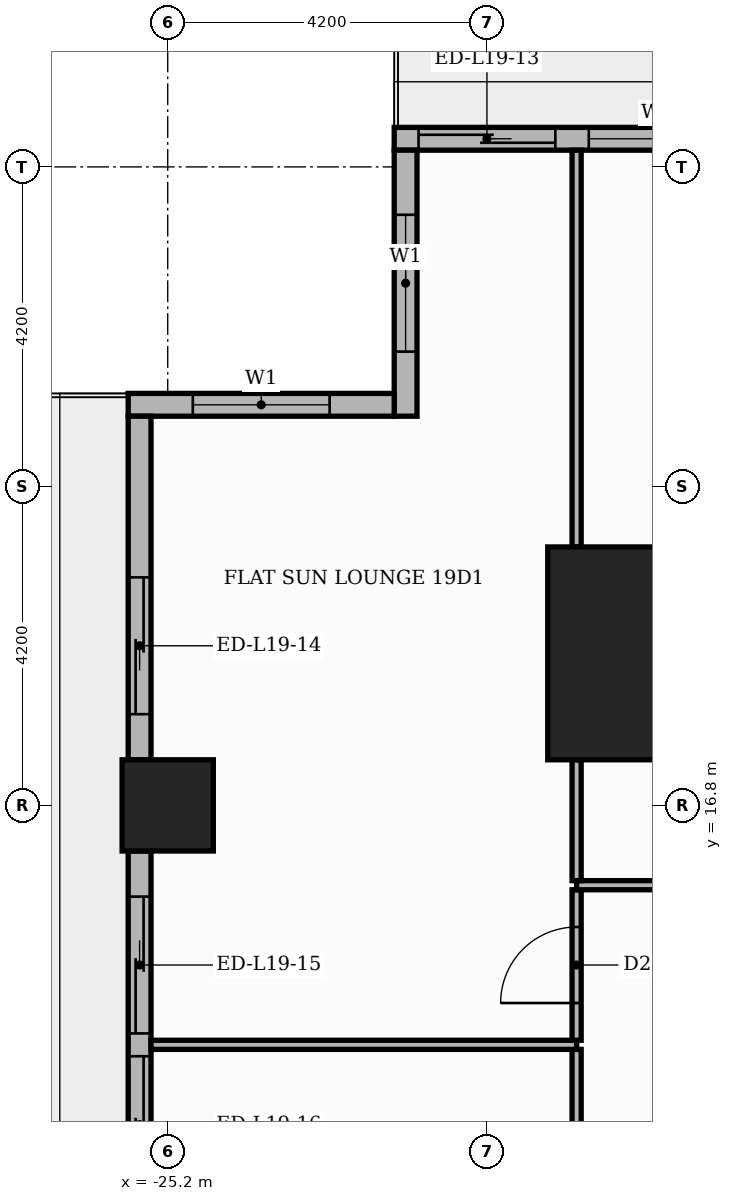
"""IFC4 building model, lengths in metres.
Left out: names, types, materials, properties, quantities, classifications, styles, units other than length and angle.
Written with IfcOpenShell. Run it as: python <this file> out.ifc"""

import sys

from ifc_helpers import new_model, si_unit, direction, frame, frame_2d, origin, origin_2d, place, context, subcontext, project, spatial, rectangle, extrude, element, fill, save


model = new_model("IFC4")
c1 = context("Model", 3, precision=1e-05, world=origin(), true_north=direction((0.0, 1.0)))
c2 = subcontext(c1, "Body", "Model", "MODEL_VIEW")
j1 = project(units=[si_unit("LENGTHUNIT", "METRE"), si_unit("PLANEANGLEUNIT", "RADIAN")], contexts=[c1])
p1 = place(None, origin())
s1 = spatial("IfcSite", under=j1, at=p1, CompositionType="ELEMENT")
p2 = place(p1, origin())
s2 = spatial("IfcBuilding", under=s1, at=p2, CompositionType="ELEMENT")
p3 = place(p2, frame((0.0, 0.0, 83.1)))
s3 = spatial("IfcBuildingStorey", under=s2, at=p3, CompositionType="ELEMENT", Elevation=83.1)
p4 = place(p3, frame((-18.8, 18.8, 0.0), z_axis=(0.0, 0.0, 1.0), x_axis=(1.0, 0.0, 0.0)))
e1 = element("IfcColumn", 1, at=p4, inside=s3, PredefinedType="COLUMN", context=c2, shape_type="SweptSolid", body=[
    extrude(rectangle(XDim=2.8, YDim=2.8, at=origin_2d()), origin(), (0.0, 0.0, 1.0), 3.9),
])
p5 = place(p3, frame((-25.2, 16.8, 0.0), z_axis=(0.0, 0.0, 1.0), x_axis=(1.0, 0.0, 0.0)))
e2 = element("IfcColumn", 2, at=p5, inside=s3, PredefinedType="COLUMN", context=c2, shape_type="SweptSolid", body=[
    extrude(rectangle(XDim=1.2, YDim=1.2, at=origin_2d()), origin(), (0.0, 0.0, 1.0), 3.9),
])
p6 = place(p3, frame((-17.4, 25.57, 0.0), z_axis=(0.0, 0.0, 1.0), x_axis=(-1.0, 0.0, 0.0)))
e3 = element("IfcWall", 3, at=p6, inside=s3, PredefinedType="STANDARD", context=c2, shape_type="SweptSolid", body=[
    extrude(rectangle(XDim=4.82, YDim=0.3, at=frame_2d((2.41, 0.0))), origin(), (0.0, 0.0, 1.0), 3.48),
])
p7 = place(p6, frame((2.7, 0.0, 0.0)))
e4 = element("IfcOpeningElement", 4, at=p7, cuts=e3, PredefinedType="OPENING", context=c2, shape_type="SweptSolid", body=[
    extrude(rectangle(XDim=1.8, YDim=2.4, at=frame_2d((0.9, 1.2))), frame((0.0, 0.16, 0.0), z_axis=(0.0, -1.0, 0.0), x_axis=(1.0, 0.0, 0.0)), (0.0, 0.0, 1.0), 0.32),
])
p8 = place(p6, frame((0.46, 0.0, 0.9)))
e5 = element("IfcOpeningElement", 5, at=p8, cuts=e3, PredefinedType="OPENING", context=c2, shape_type="SweptSolid", body=[
    extrude(rectangle(XDim=1.8, YDim=2.1, at=frame_2d((0.9, 1.05))), frame((0.0, 0.16, 0.0), z_axis=(0.0, -1.0, 0.0), x_axis=(1.0, 0.0, 0.0)), (0.0, 0.0, 1.0), 0.32),
])
p9 = place(p3, frame((-22.07, 25.42, 0.0), z_axis=(0.0, 0.0, 1.0), x_axis=(0.0, -1.0, 0.0)))
e6 = element("IfcWall", 6, at=p9, inside=s3, PredefinedType="STANDARD", context=c2, shape_type="SweptSolid", body=[
    extrude(rectangle(XDim=3.5, YDim=0.3, at=frame_2d((1.75, 0.0))), origin(), (0.0, 0.0, 1.0), 3.48),
])
p10 = place(p9, frame((0.85, 0.0, 0.9)))
e7 = element("IfcOpeningElement", 7, at=p10, cuts=e6, PredefinedType="OPENING", context=c2, shape_type="SweptSolid", body=[
    extrude(rectangle(XDim=1.8, YDim=2.1, at=frame_2d((0.9, 1.05))), frame((0.0, 0.16, 0.0), z_axis=(0.0, -1.0, 0.0), x_axis=(1.0, 0.0, 0.0)), (0.0, 0.0, 1.0), 0.32),
])
p11 = place(p3, frame((-22.22, 22.07, 0.0), z_axis=(0.0, 0.0, 1.0), x_axis=(-1.0, 0.0, 0.0)))
e8 = element("IfcWall", 8, at=p11, inside=s3, PredefinedType="STANDARD", context=c2, shape_type="SweptSolid", body=[
    extrude(rectangle(XDim=3.5, YDim=0.3, at=frame_2d((1.75, 0.0))), origin(), (0.0, 0.0, 1.0), 3.48),
])
p12 = place(p11, frame((0.85, 0.0, 0.9)))
e9 = element("IfcOpeningElement", 9, at=p12, cuts=e8, PredefinedType="OPENING", context=c2, shape_type="SweptSolid", body=[
    extrude(rectangle(XDim=1.8, YDim=2.1, at=frame_2d((0.9, 1.05))), frame((0.0, 0.16, 0.0), z_axis=(0.0, -1.0, 0.0), x_axis=(1.0, 0.0, 0.0)), (0.0, 0.0, 1.0), 0.32),
])
p13 = place(p3, frame((-25.57, 21.92, 0.0), z_axis=(0.0, 0.0, 1.0), x_axis=(0.0, -1.0, 0.0)))
e10 = element("IfcWall", 10, at=p13, inside=s3, PredefinedType="STANDARD", context=c2, shape_type="SweptSolid", body=[
    extrude(rectangle(XDim=4.52, YDim=0.3, at=frame_2d((2.26, 0.0))), origin(), (0.0, 0.0, 1.0), 3.48),
])
p14 = place(p13, frame((2.12, 0.0, 0.0)))
e11 = element("IfcOpeningElement", 11, at=p14, cuts=e10, PredefinedType="OPENING", context=c2, shape_type="SweptSolid", body=[
    extrude(rectangle(XDim=1.8, YDim=2.4, at=frame_2d((0.9, 1.2))), frame((0.0, 0.16, 0.0), z_axis=(0.0, -1.0, 0.0), x_axis=(1.0, 0.0, 0.0)), (0.0, 0.0, 1.0), 0.32),
])
p15 = place(p3, frame((-25.57, 16.2, 0.0), z_axis=(0.0, 0.0, 1.0), x_axis=(0.0, -1.0, 0.0)))
e12 = element("IfcWall", 12, at=p15, inside=s3, PredefinedType="STANDARD", context=c2, shape_type="SweptSolid", body=[
    extrude(rectangle(XDim=7.2, YDim=0.3, at=frame_2d((3.6, 0.0))), origin(), (0.0, 0.0, 1.0), 3.48),
])
p16 = place(p15, frame((0.6, 0.0, 0.0)))
e13 = element("IfcOpeningElement", 13, at=p16, cuts=e12, PredefinedType="OPENING", context=c2, shape_type="SweptSolid", body=[
    extrude(rectangle(XDim=1.8, YDim=2.4, at=frame_2d((0.9, 1.2))), frame((0.0, 0.16, 0.0), z_axis=(0.0, -1.0, 0.0), x_axis=(1.0, 0.0, 0.0)), (0.0, 0.0, 1.0), 0.32),
])
p17 = place(p15, frame((2.7, 0.0, 0.0)))
e14 = element("IfcOpeningElement", 14, at=p17, cuts=e12, PredefinedType="OPENING", context=c2, shape_type="SweptSolid", body=[
    extrude(rectangle(XDim=1.8, YDim=2.4, at=frame_2d((0.9, 1.2))), frame((0.0, 0.16, 0.0), z_axis=(0.0, -1.0, 0.0), x_axis=(1.0, 0.0, 0.0)), (0.0, 0.0, 1.0), 0.32),
])
p18 = place(p15, frame((4.8, 0.0, 0.9)))
e15 = element("IfcOpeningElement", 15, at=p18, cuts=e12, PredefinedType="OPENING", context=c2, shape_type="SweptSolid", body=[
    extrude(rectangle(XDim=1.8, YDim=2.1, at=frame_2d((0.9, 1.05))), frame((0.0, 0.16, 0.0), z_axis=(0.0, -1.0, 0.0), x_axis=(1.0, 0.0, 0.0)), (0.0, 0.0, 1.0), 0.32),
])
p19 = place(p3, frame((-19.82, 9.51, 0.0), z_axis=(0.0, 0.0, 1.0), x_axis=(0.0, 1.0, 0.0)))
e16 = element("IfcWall", 16, at=p19, inside=s3, PredefinedType="PARTITIONING", context=c2, shape_type="SweptSolid", body=[
    extrude(rectangle(XDim=4.08, YDim=0.12, at=frame_2d((2.04, 0.0))), origin(), (0.0, 0.0, 1.0), 3.48),
])
p20 = place(p19, frame((1.59, 0.0, 0.0)))
e17 = element("IfcOpeningElement", 17, at=p20, cuts=e16, PredefinedType="OPENING", context=c2, shape_type="SweptSolid", body=[
    extrude(rectangle(XDim=0.9, YDim=2.1, at=frame_2d((0.45, 1.05))), frame((0.0, 0.07, 0.0), z_axis=(0.0, -1.0, 0.0), x_axis=(1.0, 0.0, 0.0)), (0.0, 0.0, 1.0), 0.14),
])
p21 = place(p3, frame((-25.42, 13.65, 0.0), z_axis=(0.0, 0.0, 1.0), x_axis=(1.0, 0.0, 0.0)))
e18 = element("IfcWall", 18, at=p21, inside=s3, PredefinedType="PARTITIONING", context=c2, shape_type="SweptSolid", body=[
    extrude(rectangle(XDim=5.6, YDim=0.12, at=frame_2d((2.8, 0.0))), origin(), (0.0, 0.0, 1.0), 3.48),
])
p22 = place(p3, frame((-19.82, 13.71, 0.0), z_axis=(0.0, 0.0, 1.0), x_axis=(0.0, 1.0, 0.0)))
e19 = element("IfcWall", 19, at=p22, inside=s3, PredefinedType="PARTITIONING", context=c2, shape_type="SweptSolid", body=[
    extrude(rectangle(XDim=1.98, YDim=0.12, at=frame_2d((0.99, 0.0))), origin(), (0.0, 0.0, 1.0), 3.48),
])
p23 = place(p22, frame((0.49, 0.0, 0.0)))
e20 = element("IfcOpeningElement", 20, at=p23, cuts=e19, PredefinedType="OPENING", context=c2, shape_type="SweptSolid", body=[
    extrude(rectangle(XDim=1.0, YDim=2.1, at=frame_2d((0.5, 1.05))), frame((0.0, 0.07, 0.0), z_axis=(0.0, -1.0, 0.0), x_axis=(1.0, 0.0, 0.0)), (0.0, 0.0, 1.0), 0.14),
])
p24 = place(p3, frame((-19.82, 15.75, 0.0), z_axis=(0.0, 0.0, 1.0), x_axis=(1.0, 0.0, 0.0)))
e21 = element("IfcWall", 21, at=p24, inside=s3, PredefinedType="PARTITIONING", context=c2, shape_type="SweptSolid", body=[
    extrude(rectangle(XDim=6.07, YDim=0.12, at=frame_2d((3.035, 0.0))), origin(), (0.0, 0.0, 1.0), 3.48),
])
p25 = place(p24, frame((2.585, 0.0, 0.0)))
e22 = element("IfcOpeningElement", 22, at=p25, cuts=e21, PredefinedType="OPENING", context=c2, shape_type="SweptSolid", body=[
    extrude(rectangle(XDim=1.0, YDim=2.1, at=frame_2d((0.5, 1.05))), frame((0.0, 0.07, 0.0), z_axis=(0.0, -1.0, 0.0), x_axis=(1.0, 0.0, 0.0)), (0.0, 0.0, 1.0), 0.14),
])
p26 = place(p3, frame((-19.82, 15.81, 0.0), z_axis=(0.0, 0.0, 1.0), x_axis=(0.0, 1.0, 0.0)))
e23 = element("IfcWall", 23, at=p26, inside=s3, PredefinedType="PARTITIONING", context=c2, shape_type="SweptSolid", body=[
    extrude(rectangle(XDim=1.59, YDim=0.12, at=frame_2d((0.795, 0.0))), origin(), (0.0, 0.0, 1.0), 3.48),
])
p27 = place(p3, frame((-19.82, 20.2, 0.0), z_axis=(0.0, 0.0, 1.0), x_axis=(0.0, 1.0, 0.0)))
e24 = element("IfcWall", 24, at=p27, inside=s3, PredefinedType="PARTITIONING", context=c2, shape_type="SweptSolid", body=[
    extrude(rectangle(XDim=5.22, YDim=0.12, at=frame_2d((2.61, 0.0))), origin(), (0.0, 0.0, 1.0), 3.48),
])
p28 = place(p7, origin())
e25 = element("IfcDoor", 25, at=p28, inside=s3, OperationType="SLIDING_TO_LEFT", PredefinedType="DOOR", context=c2, shape_type="SweptSolid", body=[
    extrude(rectangle(XDim=1.8, YDim=2.4, at=frame_2d((0.9, 1.2))), frame((0.0, 0.025, 0.0), z_axis=(0.0, -1.0, 0.0), x_axis=(1.0, 0.0, 0.0)), (0.0, 0.0, 1.0), 0.05),
])
fill(e4, e25)
p29 = place(p8, origin())
e26 = element("IfcWindow", 26, at=p29, inside=s3, PartitioningType="SINGLE_PANEL", PredefinedType="WINDOW", context=c2, shape_type="SweptSolid", body=[
    extrude(rectangle(XDim=1.8, YDim=2.1, at=frame_2d((0.9, 1.05))), frame((0.0, 0.03, 0.0), z_axis=(0.0, -1.0, 0.0), x_axis=(1.0, 0.0, 0.0)), (0.0, 0.0, 1.0), 0.06),
])
fill(e5, e26)
p30 = place(p10, origin())
e27 = element("IfcWindow", 27, at=p30, inside=s3, PartitioningType="SINGLE_PANEL", PredefinedType="WINDOW", context=c2, shape_type="SweptSolid", body=[
    extrude(rectangle(XDim=1.8, YDim=2.1, at=frame_2d((0.9, 1.05))), frame((0.0, 0.03, 0.0), z_axis=(0.0, -1.0, 0.0), x_axis=(1.0, 0.0, 0.0)), (0.0, 0.0, 1.0), 0.06),
])
fill(e7, e27)
p31 = place(p12, origin())
e28 = element("IfcWindow", 28, at=p31, inside=s3, PartitioningType="SINGLE_PANEL", PredefinedType="WINDOW", context=c2, shape_type="SweptSolid", body=[
    extrude(rectangle(XDim=1.8, YDim=2.1, at=frame_2d((0.9, 1.05))), frame((0.0, 0.03, 0.0), z_axis=(0.0, -1.0, 0.0), x_axis=(1.0, 0.0, 0.0)), (0.0, 0.0, 1.0), 0.06),
])
fill(e9, e28)
p32 = place(p14, origin())
e29 = element("IfcDoor", 29, at=p32, inside=s3, OperationType="SLIDING_TO_RIGHT", PredefinedType="DOOR", context=c2, shape_type="SweptSolid", body=[
    extrude(rectangle(XDim=1.8, YDim=2.4, at=frame_2d((0.9, 1.2))), frame((0.0, 0.025, 0.0), z_axis=(0.0, -1.0, 0.0), x_axis=(1.0, 0.0, 0.0)), (0.0, 0.0, 1.0), 0.05),
])
fill(e11, e29)
p33 = place(p16, origin())
e30 = element("IfcDoor", 30, at=p33, inside=s3, OperationType="SLIDING_TO_LEFT", PredefinedType="DOOR", context=c2, shape_type="SweptSolid", body=[
    extrude(rectangle(XDim=1.8, YDim=2.4, at=frame_2d((0.9, 1.2))), frame((0.0, 0.025, 0.0), z_axis=(0.0, -1.0, 0.0), x_axis=(1.0, 0.0, 0.0)), (0.0, 0.0, 1.0), 0.05),
])
fill(e13, e30)
p34 = place(p17, origin())
e31 = element("IfcDoor", 31, at=p34, inside=s3, OperationType="SLIDING_TO_RIGHT", PredefinedType="DOOR", context=c2, shape_type="SweptSolid", body=[
    extrude(rectangle(XDim=1.8, YDim=2.4, at=frame_2d((0.9, 1.2))), frame((0.0, 0.025, 0.0), z_axis=(0.0, -1.0, 0.0), x_axis=(1.0, 0.0, 0.0)), (0.0, 0.0, 1.0), 0.05),
])
fill(e14, e31)
p35 = place(p23, origin())
e32 = element("IfcDoor", 32, at=p35, inside=s3, OperationType="SINGLE_SWING_LEFT", PredefinedType="DOOR", context=c2, shape_type="SweptSolid", body=[
    extrude(rectangle(XDim=1.0, YDim=2.1, at=frame_2d((0.5, 1.05))), frame((0.0, 0.025, 0.0), z_axis=(0.0, -1.0, 0.0), x_axis=(1.0, 0.0, 0.0)), (0.0, 0.0, 1.0), 0.05),
])
fill(e20, e32)
save(model, sys.argv[1])
